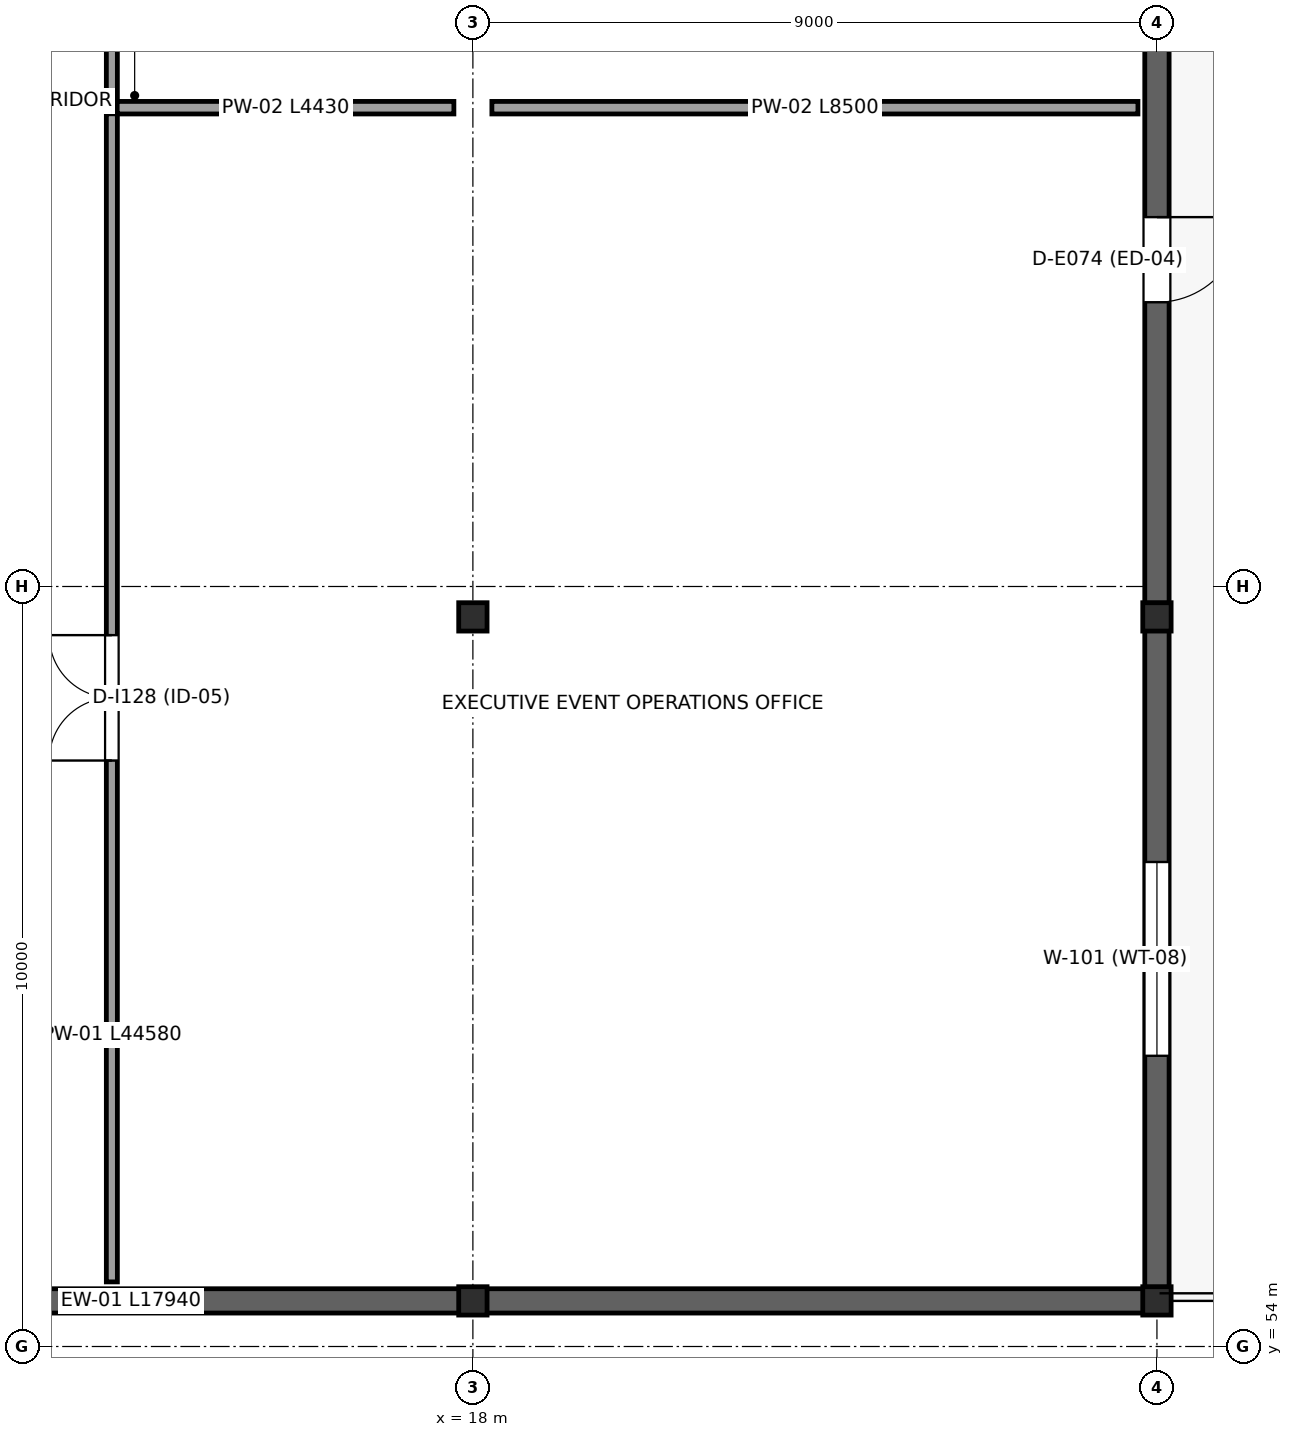
"""IFC4 building model, lengths in metres.
Left out: names, types, materials, properties, quantities, classifications, styles, units other than length and angle.
Written with IfcOpenShell. Run it as: python <this file> out.ifc"""

import sys

from ifc_helpers import new_model, si_unit, direction, frame, frame_2d, origin, origin_2d, place, context, subcontext, project, spatial, rectangle, i_section, extrude, element, fill, save


model = new_model("IFC4")
c1 = context("Model", 3, precision=1e-05, world=origin(), true_north=direction((0.0, 1.0)))
c2 = subcontext(c1, "Body", "Model", "MODEL_VIEW")
j1 = project(units=[si_unit("LENGTHUNIT", "METRE"), si_unit("PLANEANGLEUNIT", "RADIAN")], contexts=[c1])
p1 = place(None, origin())
s1 = spatial("IfcSite", under=j1, at=p1, CompositionType="ELEMENT")
p2 = place(p1, origin())
s2 = spatial("IfcBuilding", under=s1, at=p2, CompositionType="ELEMENT")
p3 = place(p2, frame((0.0, 0.0, 21.0)))
s3 = spatial("IfcBuildingStorey", under=s2, at=p3, CompositionType="ELEMENT", Elevation=21.0)
for number, where, z_axis, x_axis in (
    (1, (18.0, 54.6, 0.0), (0.0, 0.0, 1.0), (1.0, 0.0, 0.0)),
    (2, (18.0, 63.6, 0.0), (0.0, 0.0, 1.0), (1.0, 0.0, 0.0)),
    (3, (27.0, 54.6, 0.0), (0.0, 0.0, 1.0), (1.0, 0.0, 0.0)),
    (4, (27.0, 63.6, 0.0), (0.0, 0.0, 1.0), (1.0, 0.0, 0.0)),
):
    element("IfcColumn", number, at=place(p3, frame(where, z_axis=z_axis, x_axis=x_axis)), inside=s3, PredefinedType="COLUMN", context=c2, shape_type="SweptSolid", body=[
        extrude(i_section(OverallWidth=0.373, OverallDepth=0.373, WebThickness=0.016, FlangeThickness=0.026, at=origin_2d()), origin(), (0.0, 0.0, 1.0), 4.5),
    ])
p4 = place(p3, frame((27.0, 63.42, 0.0), z_axis=(0.0, 0.0, 1.0), x_axis=(0.0, -1.0, 0.0)))
e5 = element("IfcWall", 5, at=p4, inside=s3, PredefinedType="STANDARD", context=c2, shape_type="SweptSolid", body=[
    extrude(rectangle(XDim=8.64, YDim=0.32, at=frame_2d((4.32, 0.0))), origin(), (0.0, 0.0, 1.0), 4.29),
])
p5 = place(p4, frame((3.045, 0.0, 1.0)))
e6 = element("IfcOpeningElement", 6, at=p5, cuts=e5, PredefinedType="OPENING", context=c2, shape_type="SweptSolid", body=[
    extrude(rectangle(XDim=2.55, YDim=2.4, at=frame_2d((1.275, 1.2))), frame((0.0, 0.17, 0.0), z_axis=(0.0, -1.0, 0.0), x_axis=(1.0, 0.0, 0.0)), (0.0, 0.0, 1.0), 0.34),
])
p6 = place(p3, frame((27.0, 72.82, 0.0), z_axis=(0.0, 0.0, 1.0), x_axis=(0.0, -1.0, 0.0)))
e7 = element("IfcWall", 7, at=p6, inside=s3, PredefinedType="STANDARD", context=c2, shape_type="SweptSolid", body=[
    extrude(rectangle(XDim=9.04, YDim=0.32, at=frame_2d((4.52, 0.0))), origin(), (0.0, 0.0, 1.0), 4.29),
])
p7 = place(p6, frame((3.96, 0.0, 0.0)))
e8 = element("IfcOpeningElement", 8, at=p7, cuts=e7, PredefinedType="OPENING", context=c2, shape_type="SweptSolid", body=[
    extrude(rectangle(XDim=1.12, YDim=2.24, at=frame_2d((0.56, 1.12))), frame((0.0, 0.17, 0.0), z_axis=(0.0, -1.0, 0.0), x_axis=(1.0, 0.0, 0.0)), (0.0, 0.0, 1.0), 0.34),
])
for number, where, z_axis, x_axis in (
    (9, (17.985, 54.6, 0.0), (0.0, 0.0, 1.0), (-1.0, 0.0, 0.0)),
    (10, (26.985, 54.6, 0.0), (0.0, 0.0, 1.0), (-1.0, 0.0, 0.0)),
):
    element("IfcWall", number, at=place(p3, frame(where, z_axis=z_axis, x_axis=x_axis)), inside=s3, PredefinedType="STANDARD", context=c2, shape_type="SweptSolid", body=[
        extrude(rectangle(XDim=8.97, YDim=0.32, at=frame_2d((4.485, 0.0))), origin(), (0.0, 0.0, 1.0), 4.29),
    ])
p8 = place(p3, frame((13.25, 54.85, 0.0), z_axis=(0.0, 0.0, 1.0), x_axis=(0.0, 1.0, 0.0)))
e11 = element("IfcWall", 11, at=p8, inside=s3, PredefinedType="PARTITIONING", context=c2, shape_type="SweptSolid", body=[
    extrude(rectangle(XDim=15.37, YDim=0.145, at=frame_2d((7.685, 0.0))), origin(), (0.0, 0.0, 1.0), 3.5),
])
p9 = place(p8, frame((6.86, 0.0, 0.0)))
e12 = element("IfcOpeningElement", 12, at=p9, cuts=e11, PredefinedType="OPENING", context=c2, shape_type="SweptSolid", body=[
    extrude(rectangle(XDim=1.65, YDim=2.25, at=frame_2d((0.825, 1.125))), frame((0.0, 0.083, 0.0), z_axis=(0.0, -1.0, 0.0), x_axis=(1.0, 0.0, 0.0)), (0.0, 0.0, 1.0), 0.165),
])
p10 = place(p3, frame((13.25, 70.38, 0.0), z_axis=(0.0, 0.0, 1.0), x_axis=(0.0, 1.0, 0.0)))
e13 = element("IfcWall", 13, at=p10, inside=s3, PredefinedType="PARTITIONING", context=c2, shape_type="SweptSolid", body=[
    extrude(rectangle(XDim=14.84, YDim=0.145, at=frame_2d((7.42, 0.0))), origin(), (0.0, 0.0, 1.0), 3.5),
])
p11 = place(p10, frame((6.595, 0.0, 0.0)))
e14 = element("IfcOpeningElement", 14, at=p11, cuts=e13, PredefinedType="OPENING", context=c2, shape_type="SweptSolid", body=[
    extrude(rectangle(XDim=1.65, YDim=2.25, at=frame_2d((0.825, 1.125))), frame((0.0, 0.083, 0.0), z_axis=(0.0, -1.0, 0.0), x_axis=(1.0, 0.0, 0.0)), (0.0, 0.0, 1.0), 0.165),
])
p12 = place(p3, frame((13.32, 70.3, 0.0), z_axis=(0.0, 0.0, 1.0), x_axis=(1.0, 0.0, 0.0)))
e15 = element("IfcWall", 15, at=p12, inside=s3, PredefinedType="PARTITIONING", context=c2, shape_type="SweptSolid", body=[
    extrude(rectangle(XDim=4.43, YDim=0.165, at=frame_2d((2.215, 0.0))), origin(), (0.0, 0.0, 1.0), 3.5),
])
p13 = place(p3, frame((18.25, 70.3, 0.0), z_axis=(0.0, 0.0, 1.0), x_axis=(1.0, 0.0, 0.0)))
e16 = element("IfcWall", 16, at=p13, inside=s3, PredefinedType="PARTITIONING", context=c2, shape_type="SweptSolid", body=[
    extrude(rectangle(XDim=8.5, YDim=0.165, at=frame_2d((4.25, 0.0))), origin(), (0.0, 0.0, 1.0), 3.5),
])
p14 = place(p5, origin())
e17 = element("IfcWindow", 17, at=p14, inside=s3, PartitioningType="SINGLE_PANEL", PredefinedType="WINDOW", context=c2, shape_type="SweptSolid", body=[
    extrude(rectangle(XDim=2.55, YDim=2.4, at=frame_2d((1.275, 1.2))), frame((0.0, 0.03, 0.0), z_axis=(0.0, -1.0, 0.0), x_axis=(1.0, 0.0, 0.0)), (0.0, 0.0, 1.0), 0.06),
])
fill(e6, e17)
p15 = place(p7, origin())
e18 = element("IfcDoor", 18, at=p15, inside=s3, OperationType="SINGLE_SWING_LEFT", PredefinedType="DOOR", context=c2, shape_type="SweptSolid", body=[
    extrude(rectangle(XDim=1.12, YDim=2.24, at=frame_2d((0.56, 1.12))), frame((0.0, 0.025, 0.0), z_axis=(0.0, -1.0, 0.0), x_axis=(1.0, 0.0, 0.0)), (0.0, 0.0, 1.0), 0.05),
])
fill(e8, e18)
p16 = place(p9, origin())
e19 = element("IfcDoor", 19, at=p16, inside=s3, OperationType="DOUBLE_DOOR_SINGLE_SWING", PredefinedType="DOOR", context=c2, shape_type="SweptSolid", body=[
    extrude(rectangle(XDim=1.65, YDim=2.25, at=frame_2d((0.825, 1.125))), frame((0.0, 0.025, 0.0), z_axis=(0.0, -1.0, 0.0), x_axis=(1.0, 0.0, 0.0)), (0.0, 0.0, 1.0), 0.05),
])
fill(e12, e19)
save(model, sys.argv[1])
